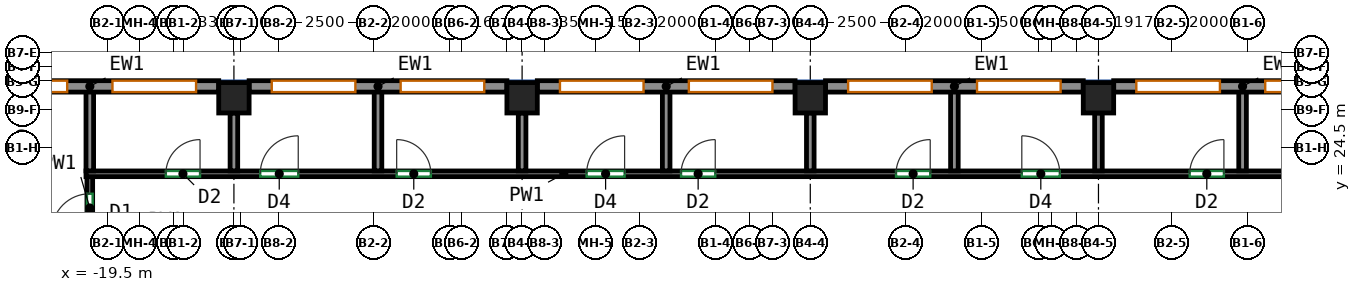
"""IFC4 building model, lengths in metres.
Left out: names, types, materials, properties, quantities, classifications, styles, units other than length and angle.
Written with IfcOpenShell. Run it as: python <this file> out.ifc"""

import sys

from ifc_helpers import new_model, si_unit, direction, frame, frame_2d, origin, origin_2d, place, context, subcontext, project, spatial, rectangle, extrude, source, transform, mapped, element, fill, save


model = new_model("IFC4")
c1 = context("Model", 3, precision=1e-05, world=origin(), true_north=direction((0.0, 1.0)))
c2 = subcontext(c1, "Body", "Model", "MODEL_VIEW")
j1 = project(units=[si_unit("LENGTHUNIT", "METRE"), si_unit("PLANEANGLEUNIT", "RADIAN")], contexts=[c1])
p1 = place(None, origin())
s1 = spatial("IfcSite", under=j1, at=p1, CompositionType="ELEMENT")
p2 = place(p1, origin())
s2 = spatial("IfcBuilding", under=s1, at=p2, CompositionType="ELEMENT")
p3 = place(p2, frame((0.0, 0.0, 175.3)))
s3 = spatial("IfcBuildingStorey", under=s2, at=p3, CompositionType="ELEMENT", Elevation=175.3)
m1 = source(origin(), c2, "Body", "SweptSolid", [
    extrude(rectangle(XDim=0.8, YDim=0.8, at=origin_2d()), origin(), (0.0, 0.0, 1.0), 3.12),
])
for number, where, z_axis, x_axis in (
    (1, (-16.167, 25.8, 0.0), (0.0, 0.0, 1.0), (1.0, 0.0, 0.0)),
    (2, (-8.583, 25.8, 0.0), (0.0, 0.0, 1.0), (1.0, 0.0, 0.0)),
    (3, (-1.0, 25.8, 0.0), (0.0, 0.0, 1.0), (1.0, 0.0, 0.0)),
    (4, (6.583, 25.8, 0.0), (0.0, 0.0, 1.0), (1.0, 0.0, 0.0)),
):
    element("IfcColumn", number, at=place(p3, frame(where, z_axis=z_axis, x_axis=x_axis)), inside=s3, PredefinedType="COLUMN", context=c2, shape_type="MappedRepresentation", body=[
        mapped(m1, transform((0.0, 0.0, 0.0))),
    ])
m2 = source(origin(), c2, "Body", "SweptSolid", [
    extrude(rectangle(XDim=6.783, YDim=0.3, at=frame_2d((3.392, 0.0))), origin(), (0.0, 0.0, 1.0), 3.12),
])
p4 = place(p3, frame((13.767, 26.1, 0.0), z_axis=(0.0, 0.0, 1.0), x_axis=(-1.0, 0.0, 0.0)))
e5 = element("IfcWall", 5, at=p4, inside=s3, PredefinedType="SOLIDWALL", context=c2, shape_type="MappedRepresentation", body=[
    mapped(m2, transform((0.0, 0.0, 0.0))),
])
p5 = place(p4, frame((0.596, 0.0, 0.85)))
e6 = element("IfcOpeningElement", 6, at=p5, cuts=e5, PredefinedType="OPENING", context=c2, shape_type="SweptSolid", body=[
    extrude(rectangle(XDim=2.2, YDim=1.95, at=frame_2d((1.1, 0.975))), frame((0.0, 0.16, 0.0), z_axis=(0.0, -1.0, 0.0), x_axis=(1.0, 0.0, 0.0)), (0.0, 0.0, 1.0), 0.32),
])
p6 = place(p4, frame((3.988, 0.0, 0.85)))
e7 = element("IfcOpeningElement", 7, at=p6, cuts=e5, PredefinedType="OPENING", context=c2, shape_type="SweptSolid", body=[
    extrude(rectangle(XDim=2.2, YDim=1.95, at=frame_2d((1.1, 0.975))), frame((0.0, 0.16, 0.0), z_axis=(0.0, -1.0, 0.0), x_axis=(1.0, 0.0, 0.0)), (0.0, 0.0, 1.0), 0.32),
])
m3 = source(origin(), c2, "Body", "SweptSolid", [
    extrude(rectangle(XDim=6.783, YDim=0.3, at=frame_2d((3.392, 0.0))), origin(), (0.0, 0.0, 1.0), 3.12),
])
p7 = place(p3, frame((6.183, 26.1, 0.0), z_axis=(0.0, 0.0, 1.0), x_axis=(-1.0, 0.0, 0.0)))
e8 = element("IfcWall", 8, at=p7, inside=s3, PredefinedType="SOLIDWALL", context=c2, shape_type="MappedRepresentation", body=[
    mapped(m3, transform((0.0, 0.0, 0.0))),
])
p8 = place(p7, frame((0.596, 0.0, 0.85)))
e9 = element("IfcOpeningElement", 9, at=p8, cuts=e8, PredefinedType="OPENING", context=c2, shape_type="SweptSolid", body=[
    extrude(rectangle(XDim=2.2, YDim=1.95, at=frame_2d((1.1, 0.975))), frame((0.0, 0.16, 0.0), z_axis=(0.0, -1.0, 0.0), x_axis=(1.0, 0.0, 0.0)), (0.0, 0.0, 1.0), 0.32),
])
p9 = place(p7, frame((3.988, 0.0, 0.85)))
e10 = element("IfcOpeningElement", 10, at=p9, cuts=e8, PredefinedType="OPENING", context=c2, shape_type="SweptSolid", body=[
    extrude(rectangle(XDim=2.2, YDim=1.95, at=frame_2d((1.1, 0.975))), frame((0.0, 0.16, 0.0), z_axis=(0.0, -1.0, 0.0), x_axis=(1.0, 0.0, 0.0)), (0.0, 0.0, 1.0), 0.32),
])
p10 = place(p3, frame((-1.4, 26.1, 0.0), z_axis=(0.0, 0.0, 1.0), x_axis=(-1.0, 0.0, 0.0)))
e11 = element("IfcWall", 11, at=p10, inside=s3, PredefinedType="SOLIDWALL", context=c2, shape_type="MappedRepresentation", body=[
    mapped(m3, transform((0.0, 0.0, 0.0))),
])
p11 = place(p10, frame((0.596, 0.0, 0.85)))
e12 = element("IfcOpeningElement", 12, at=p11, cuts=e11, PredefinedType="OPENING", context=c2, shape_type="SweptSolid", body=[
    extrude(rectangle(XDim=2.2, YDim=1.95, at=frame_2d((1.1, 0.975))), frame((0.0, 0.16, 0.0), z_axis=(0.0, -1.0, 0.0), x_axis=(1.0, 0.0, 0.0)), (0.0, 0.0, 1.0), 0.32),
])
p12 = place(p10, frame((3.988, 0.0, 0.85)))
e13 = element("IfcOpeningElement", 13, at=p12, cuts=e11, PredefinedType="OPENING", context=c2, shape_type="SweptSolid", body=[
    extrude(rectangle(XDim=2.2, YDim=1.95, at=frame_2d((1.1, 0.975))), frame((0.0, 0.16, 0.0), z_axis=(0.0, -1.0, 0.0), x_axis=(1.0, 0.0, 0.0)), (0.0, 0.0, 1.0), 0.32),
])
p13 = place(p3, frame((-8.983, 26.1, 0.0), z_axis=(0.0, 0.0, 1.0), x_axis=(-1.0, 0.0, 0.0)))
e14 = element("IfcWall", 14, at=p13, inside=s3, PredefinedType="SOLIDWALL", context=c2, shape_type="MappedRepresentation", body=[
    mapped(m2, transform((0.0, 0.0, 0.0))),
])
p14 = place(p13, frame((0.596, 0.0, 0.85)))
e15 = element("IfcOpeningElement", 15, at=p14, cuts=e14, PredefinedType="OPENING", context=c2, shape_type="SweptSolid", body=[
    extrude(rectangle(XDim=2.2, YDim=1.95, at=frame_2d((1.1, 0.975))), frame((0.0, 0.16, 0.0), z_axis=(0.0, -1.0, 0.0), x_axis=(1.0, 0.0, 0.0)), (0.0, 0.0, 1.0), 0.32),
])
p15 = place(p13, frame((3.988, 0.0, 0.85)))
e16 = element("IfcOpeningElement", 16, at=p15, cuts=e14, PredefinedType="OPENING", context=c2, shape_type="SweptSolid", body=[
    extrude(rectangle(XDim=2.2, YDim=1.95, at=frame_2d((1.1, 0.975))), frame((0.0, 0.16, 0.0), z_axis=(0.0, -1.0, 0.0), x_axis=(1.0, 0.0, 0.0)), (0.0, 0.0, 1.0), 0.32),
])
p16 = place(p3, frame((-16.567, 26.1, 0.0), z_axis=(0.0, 0.0, 1.0), x_axis=(-1.0, 0.0, 0.0)))
e17 = element("IfcWall", 17, at=p16, inside=s3, PredefinedType="SOLIDWALL", context=c2, shape_type="MappedRepresentation", body=[
    mapped(m3, transform((0.0, 0.0, 0.0))),
])
p17 = place(p16, frame((0.596, 0.0, 0.85)))
e18 = element("IfcOpeningElement", 18, at=p17, cuts=e17, PredefinedType="OPENING", context=c2, shape_type="SweptSolid", body=[
    extrude(rectangle(XDim=2.2, YDim=1.95, at=frame_2d((1.1, 0.975))), frame((0.0, 0.16, 0.0), z_axis=(0.0, -1.0, 0.0), x_axis=(1.0, 0.0, 0.0)), (0.0, 0.0, 1.0), 0.32),
])
p18 = place(p16, frame((3.988, 0.0, 0.85)))
e19 = element("IfcOpeningElement", 19, at=p18, cuts=e17, PredefinedType="OPENING", context=c2, shape_type="SweptSolid", body=[
    extrude(rectangle(XDim=2.2, YDim=1.95, at=frame_2d((1.1, 0.975))), frame((0.0, 0.16, 0.0), z_axis=(0.0, -1.0, 0.0), x_axis=(1.0, 0.0, 0.0)), (0.0, 0.0, 1.0), 0.32),
])
p19 = place(p3, frame((-19.959, 22.075, 0.0), z_axis=(0.0, 0.0, 1.0), x_axis=(0.0, 1.0, 0.0)))
e20 = element("IfcWall", 20, at=p19, inside=s3, PredefinedType="PARTITIONING", context=c2, shape_type="SweptSolid", body=[
    extrude(rectangle(XDim=1.65, YDim=0.15, at=frame_2d((0.825, 0.0))), origin(), (0.0, 0.0, 1.0), 3.12),
])
p20 = place(p19, frame((0.2, 0.0, 0.0)))
e21 = element("IfcOpeningElement", 21, at=p20, cuts=e20, PredefinedType="OPENING", context=c2, shape_type="SweptSolid", body=[
    extrude(rectangle(XDim=1.0, YDim=2.1, at=frame_2d((0.5, 1.05))), frame((0.0, 0.085, 0.0), z_axis=(0.0, -1.0, 0.0), x_axis=(1.0, 0.0, 0.0)), (0.0, 0.0, 1.0), 0.17),
])
p21 = place(p3, frame((-20.059, 23.8, 0.0), z_axis=(0.0, 0.0, 1.0), x_axis=(1.0, 0.0, 0.0)))
e22 = element("IfcWall", 22, at=p21, inside=s3, PredefinedType="PARTITIONING", context=c2, shape_type="SweptSolid", body=[
    extrude(rectangle(XDim=41.909, YDim=0.15, at=frame_2d((20.955, 0.0))), origin(), (0.0, 0.0, 1.0), 3.12),
])
p22 = place(p21, frame((2.101, 0.0, 0.0)))
e23 = element("IfcOpeningElement", 23, at=p22, cuts=e22, PredefinedType="OPENING", context=c2, shape_type="SweptSolid", body=[
    extrude(rectangle(XDim=0.9, YDim=2.1, at=frame_2d((0.45, 1.05))), frame((0.0, 0.085, 0.0), z_axis=(0.0, -1.0, 0.0), x_axis=(1.0, 0.0, 0.0)), (0.0, 0.0, 1.0), 0.17),
])
p23 = place(p21, frame((4.585, 0.0, 0.0)))
e24 = element("IfcOpeningElement", 24, at=p23, cuts=e22, PredefinedType="OPENING", context=c2, shape_type="SweptSolid", body=[
    extrude(rectangle(XDim=1.0, YDim=2.1, at=frame_2d((0.5, 1.05))), frame((0.0, 0.085, 0.0), z_axis=(0.0, -1.0, 0.0), x_axis=(1.0, 0.0, 0.0)), (0.0, 0.0, 1.0), 0.17),
])
p24 = place(p21, frame((8.175, 0.0, 0.0)))
e25 = element("IfcOpeningElement", 25, at=p24, cuts=e22, PredefinedType="OPENING", context=c2, shape_type="SweptSolid", body=[
    extrude(rectangle(XDim=0.9, YDim=2.1, at=frame_2d((0.45, 1.05))), frame((0.0, 0.085, 0.0), z_axis=(0.0, -1.0, 0.0), x_axis=(1.0, 0.0, 0.0)), (0.0, 0.0, 1.0), 0.17),
])
p25 = place(p21, frame((13.173, 0.0, 0.0)))
e26 = element("IfcOpeningElement", 26, at=p25, cuts=e22, PredefinedType="OPENING", context=c2, shape_type="SweptSolid", body=[
    extrude(rectangle(XDim=1.0, YDim=2.1, at=frame_2d((0.5, 1.05))), frame((0.0, 0.085, 0.0), z_axis=(0.0, -1.0, 0.0), x_axis=(1.0, 0.0, 0.0)), (0.0, 0.0, 1.0), 0.17),
])
p26 = place(p21, frame((15.658, 0.0, 0.0)))
e27 = element("IfcOpeningElement", 27, at=p26, cuts=e22, PredefinedType="OPENING", context=c2, shape_type="SweptSolid", body=[
    extrude(rectangle(XDim=0.9, YDim=2.1, at=frame_2d((0.45, 1.05))), frame((0.0, 0.085, 0.0), z_axis=(0.0, -1.0, 0.0), x_axis=(1.0, 0.0, 0.0)), (0.0, 0.0, 1.0), 0.17),
])
p27 = place(p21, frame((21.315, 0.0, 0.0)))
e28 = element("IfcOpeningElement", 28, at=p27, cuts=e22, PredefinedType="OPENING", context=c2, shape_type="SweptSolid", body=[
    extrude(rectangle(XDim=0.9, YDim=2.1, at=frame_2d((0.45, 1.05))), frame((0.0, 0.085, 0.0), z_axis=(0.0, -1.0, 0.0), x_axis=(1.0, 0.0, 0.0)), (0.0, 0.0, 1.0), 0.17),
])
p28 = place(p21, frame((24.625, 0.0, 0.0)))
e29 = element("IfcOpeningElement", 29, at=p28, cuts=e22, PredefinedType="OPENING", context=c2, shape_type="SweptSolid", body=[
    extrude(rectangle(XDim=1.0, YDim=2.1, at=frame_2d((0.5, 1.05))), frame((0.0, 0.085, 0.0), z_axis=(0.0, -1.0, 0.0), x_axis=(1.0, 0.0, 0.0)), (0.0, 0.0, 1.0), 0.17),
])
p29 = place(p21, frame((29.043, 0.0, 0.0)))
e30 = element("IfcOpeningElement", 30, at=p29, cuts=e22, PredefinedType="OPENING", context=c2, shape_type="SweptSolid", body=[
    extrude(rectangle(XDim=0.9, YDim=2.1, at=frame_2d((0.45, 1.05))), frame((0.0, 0.085, 0.0), z_axis=(0.0, -1.0, 0.0), x_axis=(1.0, 0.0, 0.0)), (0.0, 0.0, 1.0), 0.17),
])
p30 = place(p21, frame((32.735, 0.0, 0.0)))
e31 = element("IfcOpeningElement", 31, at=p30, cuts=e22, PredefinedType="OPENING", context=c2, shape_type="SweptSolid", body=[
    extrude(rectangle(XDim=1.0, YDim=2.1, at=frame_2d((0.5, 1.05))), frame((0.0, 0.085, 0.0), z_axis=(0.0, -1.0, 0.0), x_axis=(1.0, 0.0, 0.0)), (0.0, 0.0, 1.0), 0.17),
])
p31 = place(p21, frame((36.627, 0.0, 0.0)))
e32 = element("IfcOpeningElement", 32, at=p31, cuts=e22, PredefinedType="OPENING", context=c2, shape_type="SweptSolid", body=[
    extrude(rectangle(XDim=0.9, YDim=2.1, at=frame_2d((0.45, 1.05))), frame((0.0, 0.085, 0.0), z_axis=(0.0, -1.0, 0.0), x_axis=(1.0, 0.0, 0.0)), (0.0, 0.0, 1.0), 0.17),
])
p32 = place(p21, frame((38.808, 0.0, 0.0)))
e33 = element("IfcOpeningElement", 33, at=p32, cuts=e22, PredefinedType="OPENING", context=c2, shape_type="SweptSolid", body=[
    extrude(rectangle(XDim=0.9, YDim=2.1, at=frame_2d((0.45, 1.05))), frame((0.0, 0.085, 0.0), z_axis=(0.0, -1.0, 0.0), x_axis=(1.0, 0.0, 0.0)), (0.0, 0.0, 1.0), 0.17),
])
p33 = place(p3, frame((-19.959, 23.877, 0.0), z_axis=(0.0, 0.0, 1.0), x_axis=(0.0, 1.0, 0.0)))
e34 = element("IfcWall", 34, at=p33, inside=s3, PredefinedType="PARTITIONING", context=c2, shape_type="SweptSolid", body=[
    extrude(rectangle(XDim=2.123, YDim=0.2, at=frame_2d((1.062, 0.0))), origin(), (0.0, 0.0, 1.0), 3.12),
])
p34 = place(p3, frame((-16.167, 23.877, 0.0), z_axis=(0.0, 0.0, 1.0), x_axis=(0.0, 1.0, 0.0)))
e35 = element("IfcWall", 35, at=p34, inside=s3, PredefinedType="PARTITIONING", context=c2, shape_type="SweptSolid", body=[
    extrude(rectangle(XDim=1.523, YDim=0.2, at=frame_2d((0.761, 0.0))), origin(), (0.0, 0.0, 1.0), 3.12),
])
p35 = place(p3, frame((-12.375, 23.877, 0.0), z_axis=(0.0, 0.0, 1.0), x_axis=(0.0, 1.0, 0.0)))
e36 = element("IfcWall", 36, at=p35, inside=s3, PredefinedType="PARTITIONING", context=c2, shape_type="SweptSolid", body=[
    extrude(rectangle(XDim=2.123, YDim=0.2, at=frame_2d((1.062, 0.0))), origin(), (0.0, 0.0, 1.0), 3.12),
])
p36 = place(p3, frame((-8.583, 23.877, 0.0), z_axis=(0.0, 0.0, 1.0), x_axis=(0.0, 1.0, 0.0)))
e37 = element("IfcWall", 37, at=p36, inside=s3, PredefinedType="PARTITIONING", context=c2, shape_type="SweptSolid", body=[
    extrude(rectangle(XDim=1.523, YDim=0.2, at=frame_2d((0.761, 0.0))), origin(), (0.0, 0.0, 1.0), 3.12),
])
p37 = place(p3, frame((-4.792, 23.877, 0.0), z_axis=(0.0, 0.0, 1.0), x_axis=(0.0, 1.0, 0.0)))
e38 = element("IfcWall", 38, at=p37, inside=s3, PredefinedType="PARTITIONING", context=c2, shape_type="SweptSolid", body=[
    extrude(rectangle(XDim=2.123, YDim=0.2, at=frame_2d((1.062, 0.0))), origin(), (0.0, 0.0, 1.0), 3.12),
])
p38 = place(p3, frame((-1.0, 23.877, 0.0), z_axis=(0.0, 0.0, 1.0), x_axis=(0.0, 1.0, 0.0)))
e39 = element("IfcWall", 39, at=p38, inside=s3, PredefinedType="PARTITIONING", context=c2, shape_type="SweptSolid", body=[
    extrude(rectangle(XDim=1.523, YDim=0.2, at=frame_2d((0.761, 0.0))), origin(), (0.0, 0.0, 1.0), 3.12),
])
p39 = place(p3, frame((2.792, 23.877, 0.0), z_axis=(0.0, 0.0, 1.0), x_axis=(0.0, 1.0, 0.0)))
e40 = element("IfcWall", 40, at=p39, inside=s3, PredefinedType="PARTITIONING", context=c2, shape_type="SweptSolid", body=[
    extrude(rectangle(XDim=2.123, YDim=0.2, at=frame_2d((1.062, 0.0))), origin(), (0.0, 0.0, 1.0), 3.12),
])
p40 = place(p3, frame((6.583, 23.877, 0.0), z_axis=(0.0, 0.0, 1.0), x_axis=(0.0, 1.0, 0.0)))
e41 = element("IfcWall", 41, at=p40, inside=s3, PredefinedType="PARTITIONING", context=c2, shape_type="SweptSolid", body=[
    extrude(rectangle(XDim=1.523, YDim=0.2, at=frame_2d((0.761, 0.0))), origin(), (0.0, 0.0, 1.0), 3.12),
])
p41 = place(p3, frame((10.375, 23.877, 0.0), z_axis=(0.0, 0.0, 1.0), x_axis=(0.0, 1.0, 0.0)))
e42 = element("IfcWall", 42, at=p41, inside=s3, PredefinedType="PARTITIONING", context=c2, shape_type="SweptSolid", body=[
    extrude(rectangle(XDim=2.123, YDim=0.2, at=frame_2d((1.062, 0.0))), origin(), (0.0, 0.0, 1.0), 3.12),
])
p42 = place(p5, origin())
e43 = element("IfcWindow", 43, at=p42, inside=s3, PartitioningType="SINGLE_PANEL", PredefinedType="WINDOW", context=c2, shape_type="SweptSolid", body=[
    extrude(rectangle(XDim=2.2, YDim=1.95, at=frame_2d((1.1, 0.975))), frame((0.0, 0.03, 0.0), z_axis=(0.0, -1.0, 0.0), x_axis=(1.0, 0.0, 0.0)), (0.0, 0.0, 1.0), 0.06),
])
fill(e6, e43)
p43 = place(p6, origin())
e44 = element("IfcWindow", 44, at=p43, inside=s3, PartitioningType="SINGLE_PANEL", PredefinedType="WINDOW", context=c2, shape_type="SweptSolid", body=[
    extrude(rectangle(XDim=2.2, YDim=1.95, at=frame_2d((1.1, 0.975))), frame((0.0, 0.03, 0.0), z_axis=(0.0, -1.0, 0.0), x_axis=(1.0, 0.0, 0.0)), (0.0, 0.0, 1.0), 0.06),
])
fill(e7, e44)
p44 = place(p8, origin())
e45 = element("IfcWindow", 45, at=p44, inside=s3, PartitioningType="SINGLE_PANEL", PredefinedType="WINDOW", context=c2, shape_type="SweptSolid", body=[
    extrude(rectangle(XDim=2.2, YDim=1.95, at=frame_2d((1.1, 0.975))), frame((0.0, 0.03, 0.0), z_axis=(0.0, -1.0, 0.0), x_axis=(1.0, 0.0, 0.0)), (0.0, 0.0, 1.0), 0.06),
])
fill(e9, e45)
p45 = place(p9, origin())
e46 = element("IfcWindow", 46, at=p45, inside=s3, PartitioningType="SINGLE_PANEL", PredefinedType="WINDOW", context=c2, shape_type="SweptSolid", body=[
    extrude(rectangle(XDim=2.2, YDim=1.95, at=frame_2d((1.1, 0.975))), frame((0.0, 0.03, 0.0), z_axis=(0.0, -1.0, 0.0), x_axis=(1.0, 0.0, 0.0)), (0.0, 0.0, 1.0), 0.06),
])
fill(e10, e46)
p46 = place(p11, origin())
e47 = element("IfcWindow", 47, at=p46, inside=s3, PartitioningType="SINGLE_PANEL", PredefinedType="WINDOW", context=c2, shape_type="SweptSolid", body=[
    extrude(rectangle(XDim=2.2, YDim=1.95, at=frame_2d((1.1, 0.975))), frame((0.0, 0.03, 0.0), z_axis=(0.0, -1.0, 0.0), x_axis=(1.0, 0.0, 0.0)), (0.0, 0.0, 1.0), 0.06),
])
fill(e12, e47)
p47 = place(p12, origin())
e48 = element("IfcWindow", 48, at=p47, inside=s3, PartitioningType="SINGLE_PANEL", PredefinedType="WINDOW", context=c2, shape_type="SweptSolid", body=[
    extrude(rectangle(XDim=2.2, YDim=1.95, at=frame_2d((1.1, 0.975))), frame((0.0, 0.03, 0.0), z_axis=(0.0, -1.0, 0.0), x_axis=(1.0, 0.0, 0.0)), (0.0, 0.0, 1.0), 0.06),
])
fill(e13, e48)
p48 = place(p14, origin())
e49 = element("IfcWindow", 49, at=p48, inside=s3, PartitioningType="SINGLE_PANEL", PredefinedType="WINDOW", context=c2, shape_type="SweptSolid", body=[
    extrude(rectangle(XDim=2.2, YDim=1.95, at=frame_2d((1.1, 0.975))), frame((0.0, 0.03, 0.0), z_axis=(0.0, -1.0, 0.0), x_axis=(1.0, 0.0, 0.0)), (0.0, 0.0, 1.0), 0.06),
])
fill(e15, e49)
p49 = place(p15, origin())
e50 = element("IfcWindow", 50, at=p49, inside=s3, PartitioningType="SINGLE_PANEL", PredefinedType="WINDOW", context=c2, shape_type="SweptSolid", body=[
    extrude(rectangle(XDim=2.2, YDim=1.95, at=frame_2d((1.1, 0.975))), frame((0.0, 0.03, 0.0), z_axis=(0.0, -1.0, 0.0), x_axis=(1.0, 0.0, 0.0)), (0.0, 0.0, 1.0), 0.06),
])
fill(e16, e50)
p50 = place(p17, origin())
e51 = element("IfcWindow", 51, at=p50, inside=s3, PartitioningType="SINGLE_PANEL", PredefinedType="WINDOW", context=c2, shape_type="SweptSolid", body=[
    extrude(rectangle(XDim=2.2, YDim=1.95, at=frame_2d((1.1, 0.975))), frame((0.0, 0.03, 0.0), z_axis=(0.0, -1.0, 0.0), x_axis=(1.0, 0.0, 0.0)), (0.0, 0.0, 1.0), 0.06),
])
fill(e18, e51)
p51 = place(p18, origin())
e52 = element("IfcWindow", 52, at=p51, inside=s3, PartitioningType="SINGLE_PANEL", PredefinedType="WINDOW", context=c2, shape_type="SweptSolid", body=[
    extrude(rectangle(XDim=2.2, YDim=1.95, at=frame_2d((1.1, 0.975))), frame((0.0, 0.03, 0.0), z_axis=(0.0, -1.0, 0.0), x_axis=(1.0, 0.0, 0.0)), (0.0, 0.0, 1.0), 0.06),
])
fill(e19, e52)
p52 = place(p20, origin())
e53 = element("IfcDoor", 53, at=p52, inside=s3, OperationType="SINGLE_SWING_LEFT", PredefinedType="DOOR", context=c2, shape_type="SweptSolid", body=[
    extrude(rectangle(XDim=1.0, YDim=2.1, at=frame_2d((0.5, 1.05))), frame((0.0, 0.025, 0.0), z_axis=(0.0, -1.0, 0.0), x_axis=(1.0, 0.0, 0.0)), (0.0, 0.0, 1.0), 0.05),
])
fill(e21, e53)
p53 = place(p22, origin())
e54 = element("IfcDoor", 54, at=p53, inside=s3, OperationType="SINGLE_SWING_RIGHT", PredefinedType="DOOR", context=c2, shape_type="SweptSolid", body=[
    extrude(rectangle(XDim=0.9, YDim=2.1, at=frame_2d((0.45, 1.05))), frame((0.0, 0.025, 0.0), z_axis=(0.0, -1.0, 0.0), x_axis=(1.0, 0.0, 0.0)), (0.0, 0.0, 1.0), 0.05),
])
fill(e23, e54)
p54 = place(p23, origin())
e55 = element("IfcDoor", 55, at=p54, inside=s3, OperationType="SINGLE_SWING_RIGHT", PredefinedType="DOOR", context=c2, shape_type="SweptSolid", body=[
    extrude(rectangle(XDim=1.0, YDim=2.1, at=frame_2d((0.5, 1.05))), frame((0.0, 0.025, 0.0), z_axis=(0.0, -1.0, 0.0), x_axis=(1.0, 0.0, 0.0)), (0.0, 0.0, 1.0), 0.05),
])
fill(e24, e55)
p55 = place(p24, origin())
e56 = element("IfcDoor", 56, at=p55, inside=s3, OperationType="SINGLE_SWING_LEFT", PredefinedType="DOOR", context=c2, shape_type="SweptSolid", body=[
    extrude(rectangle(XDim=0.9, YDim=2.1, at=frame_2d((0.45, 1.05))), frame((0.0, 0.025, 0.0), z_axis=(0.0, -1.0, 0.0), x_axis=(1.0, 0.0, 0.0)), (0.0, 0.0, 1.0), 0.05),
])
fill(e25, e56)
p56 = place(p25, origin())
e57 = element("IfcDoor", 57, at=p56, inside=s3, OperationType="SINGLE_SWING_RIGHT", PredefinedType="DOOR", context=c2, shape_type="SweptSolid", body=[
    extrude(rectangle(XDim=1.0, YDim=2.1, at=frame_2d((0.5, 1.05))), frame((0.0, 0.025, 0.0), z_axis=(0.0, -1.0, 0.0), x_axis=(1.0, 0.0, 0.0)), (0.0, 0.0, 1.0), 0.05),
])
fill(e26, e57)
p57 = place(p26, origin())
e58 = element("IfcDoor", 58, at=p57, inside=s3, OperationType="SINGLE_SWING_RIGHT", PredefinedType="DOOR", context=c2, shape_type="SweptSolid", body=[
    extrude(rectangle(XDim=0.9, YDim=2.1, at=frame_2d((0.45, 1.05))), frame((0.0, 0.025, 0.0), z_axis=(0.0, -1.0, 0.0), x_axis=(1.0, 0.0, 0.0)), (0.0, 0.0, 1.0), 0.05),
])
fill(e27, e58)
p58 = place(p27, origin())
e59 = element("IfcDoor", 59, at=p58, inside=s3, OperationType="SINGLE_SWING_RIGHT", PredefinedType="DOOR", context=c2, shape_type="SweptSolid", body=[
    extrude(rectangle(XDim=0.9, YDim=2.1, at=frame_2d((0.45, 1.05))), frame((0.0, 0.025, 0.0), z_axis=(0.0, -1.0, 0.0), x_axis=(1.0, 0.0, 0.0)), (0.0, 0.0, 1.0), 0.05),
])
fill(e28, e59)
p59 = place(p28, origin())
e60 = element("IfcDoor", 60, at=p59, inside=s3, OperationType="SINGLE_SWING_LEFT", PredefinedType="DOOR", context=c2, shape_type="SweptSolid", body=[
    extrude(rectangle(XDim=1.0, YDim=2.1, at=frame_2d((0.5, 1.05))), frame((0.0, 0.025, 0.0), z_axis=(0.0, -1.0, 0.0), x_axis=(1.0, 0.0, 0.0)), (0.0, 0.0, 1.0), 0.05),
])
fill(e29, e60)
p60 = place(p29, origin())
e61 = element("IfcDoor", 61, at=p60, inside=s3, OperationType="SINGLE_SWING_RIGHT", PredefinedType="DOOR", context=c2, shape_type="SweptSolid", body=[
    extrude(rectangle(XDim=0.9, YDim=2.1, at=frame_2d((0.45, 1.05))), frame((0.0, 0.025, 0.0), z_axis=(0.0, -1.0, 0.0), x_axis=(1.0, 0.0, 0.0)), (0.0, 0.0, 1.0), 0.05),
])
fill(e30, e61)
save(model, sys.argv[1])
